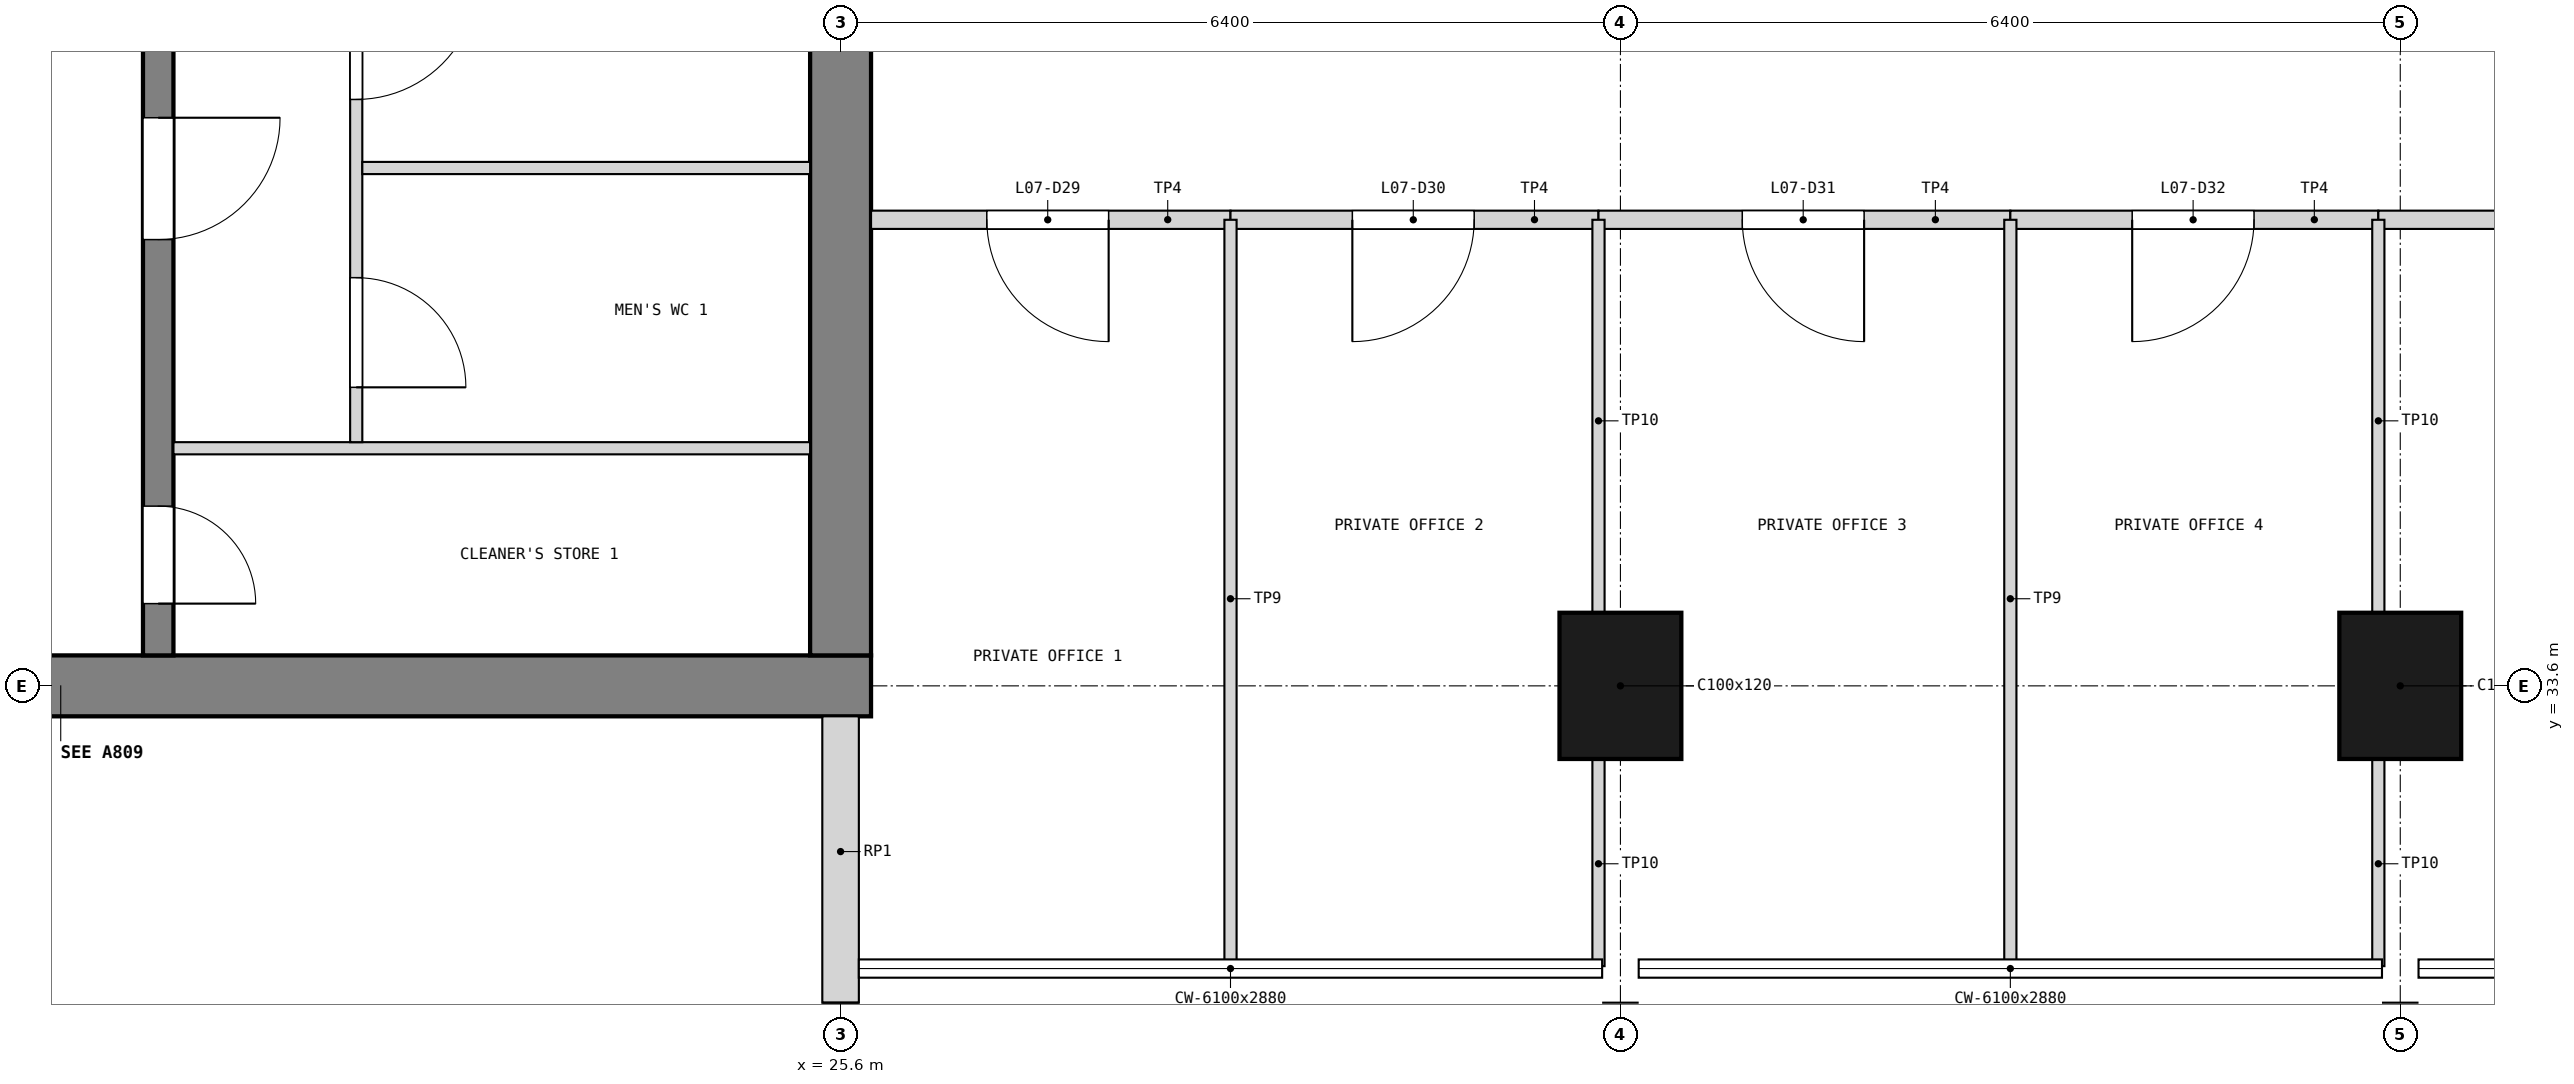
"""IFC4 building model, lengths in metres.
Left out: names, types, materials, properties, quantities, classifications, styles, units other than length and angle.
Written with IfcOpenShell. Run it as: python <this file> out.ifc"""

import sys

from ifc_helpers import new_model, si_unit, direction, frame, frame_2d, origin, origin_2d, place, context, subcontext, project, spatial, rectangle, extrude, element, fill, save


model = new_model("IFC4")
c1 = context("Model", 3, precision=1e-05, world=origin(), true_north=direction((0.0, 1.0)))
c2 = subcontext(c1, "Body", "Model", "MODEL_VIEW")
j1 = project(units=[si_unit("LENGTHUNIT", "METRE"), si_unit("PLANEANGLEUNIT", "RADIAN")], contexts=[c1])
p1 = place(None, origin())
s1 = spatial("IfcSite", under=j1, at=p1, CompositionType="ELEMENT")
p2 = place(p1, origin())
s2 = spatial("IfcBuilding", under=s1, at=p2, CompositionType="ELEMENT")
p3 = place(p2, frame((0.0, 0.0, 28.8)))
s3 = spatial("IfcBuildingStorey", under=s2, at=p3, CompositionType="ELEMENT", Elevation=28.8)
p4 = place(p3, frame((12.55, 33.6, 0.0), z_axis=(0.0, 0.0, 1.0), x_axis=(1.0, 0.0, 0.0)))
e1 = element("IfcWall", 1, at=p4, inside=s3, PredefinedType="SHEAR", context=c2, shape_type="SweptSolid", body=[
    extrude(rectangle(XDim=13.3, YDim=0.5, at=frame_2d((6.65, 0.0))), origin(), (0.0, 0.0, 1.0), 3.9),
])
p5 = place(p4, frame((1.85, 0.0, 1.0)))
e2 = element("IfcOpeningElement", 2, at=p5, cuts=e1, PredefinedType="OPENING", context=c2, shape_type="SweptSolid", body=[
    extrude(rectangle(XDim=0.4, YDim=2.0, at=frame_2d((0.2, 1.0))), frame((0.0, 0.26, 0.0), z_axis=(0.0, -1.0, 0.0), x_axis=(1.0, 0.0, 0.0)), (0.0, 0.0, 1.0), 0.52),
])
p6 = place(p3, frame((25.6, 33.85, 0.0), z_axis=(0.0, 0.0, 1.0), x_axis=(0.0, 1.0, 0.0)))
e3 = element("IfcWall", 3, at=p6, inside=s3, PredefinedType="SHEAR", context=c2, shape_type="SweptSolid", body=[
    extrude(rectangle(XDim=18.7, YDim=0.5, at=frame_2d((9.35, 0.0))), origin(), (0.0, 0.0, 1.0), 3.9),
])
p7 = place(p6, frame((8.35, 0.0, 0.0)))
e4 = element("IfcOpeningElement", 4, at=p7, cuts=e3, PredefinedType="OPENING", context=c2, shape_type="SweptSolid", body=[
    extrude(rectangle(XDim=2.0, YDim=2.1, at=frame_2d((1.0, 1.05))), frame((0.0, 0.26, 0.0), z_axis=(0.0, -1.0, 0.0), x_axis=(1.0, 0.0, 0.0)), (0.0, 0.0, 1.0), 0.52),
])
for number, where, z_axis, x_axis in (
    (5, (32.0, 33.6, 0.0), (0.0, 0.0, 1.0), (1.0, 0.0, 0.0)),
    (6, (38.4, 33.6, 0.0), (0.0, 0.0, 1.0), (1.0, 0.0, 0.0)),
):
    element("IfcColumn", number, at=place(p3, frame(where, z_axis=z_axis, x_axis=x_axis)), inside=s3, PredefinedType="COLUMN", context=c2, shape_type="SweptSolid", body=[
        extrude(rectangle(XDim=1.0, YDim=1.2, at=origin_2d()), origin(), (0.0, 0.0, 1.0), 3.9),
    ])
p8 = place(p3, frame((25.6, 31.0, 0.0), z_axis=(0.0, 0.0, 1.0), x_axis=(0.0, 1.0, 0.0)))
e7 = element("IfcWall", 7, at=p8, inside=s3, PredefinedType="SOLIDWALL", context=c2, shape_type="SweptSolid", body=[
    extrude(rectangle(XDim=2.35, YDim=0.3, at=frame_2d((1.175, 0.0))), origin(), (0.0, 0.0, 1.0), 2.88),
])
p9 = place(p3, frame((20.0, 33.85, 0.0), z_axis=(0.0, 0.0, 1.0), x_axis=(0.0, 1.0, 0.0)))
e8 = element("IfcWall", 8, at=p9, inside=s3, PredefinedType="SOLIDWALL", context=c2, shape_type="SweptSolid", body=[
    extrude(rectangle(XDim=6.075, YDim=0.25, at=frame_2d((3.038, 0.0))), origin(), (0.0, 0.0, 1.0), 3.6),
])
p10 = place(p9, frame((0.425, 0.0, 0.0)))
e9 = element("IfcOpeningElement", 9, at=p10, cuts=e8, PredefinedType="OPENING", context=c2, shape_type="SweptSolid", body=[
    extrude(rectangle(XDim=0.8, YDim=2.1, at=frame_2d((0.4, 1.05))), frame((0.0, 0.135, 0.0), z_axis=(0.0, -1.0, 0.0), x_axis=(1.0, 0.0, 0.0)), (0.0, 0.0, 1.0), 0.27),
])
p11 = place(p9, frame((3.413, 0.0, 0.0)))
e10 = element("IfcOpeningElement", 10, at=p11, cuts=e8, PredefinedType="OPENING", context=c2, shape_type="SweptSolid", body=[
    extrude(rectangle(XDim=1.0, YDim=2.1, at=frame_2d((0.5, 1.05))), frame((0.0, 0.135, 0.0), z_axis=(0.0, -1.0, 0.0), x_axis=(1.0, 0.0, 0.0)), (0.0, 0.0, 1.0), 0.27),
])
p12 = place(p3, frame((20.125, 35.55, 0.0), z_axis=(0.0, 0.0, 1.0), x_axis=(1.0, 0.0, 0.0)))
e11 = element("IfcWall", 11, at=p12, inside=s3, PredefinedType="PARTITIONING", context=c2, shape_type="SweptSolid", body=[
    extrude(rectangle(XDim=5.225, YDim=0.1, at=frame_2d((2.613, 0.0))), origin(), (0.0, 0.0, 1.0), 3.6),
])
p13 = place(p3, frame((21.625, 35.6, 0.0), z_axis=(0.0, 0.0, 1.0), x_axis=(0.0, 1.0, 0.0)))
e12 = element("IfcWall", 12, at=p13, inside=s3, PredefinedType="PARTITIONING", context=c2, shape_type="SweptSolid", body=[
    extrude(rectangle(XDim=4.325, YDim=0.1, at=frame_2d((2.163, 0.0))), origin(), (0.0, 0.0, 1.0), 3.6),
])
p14 = place(p13, frame((0.45, 0.0, 0.0)))
e13 = element("IfcOpeningElement", 13, at=p14, cuts=e12, PredefinedType="OPENING", context=c2, shape_type="SweptSolid", body=[
    extrude(rectangle(XDim=0.9, YDim=2.1, at=frame_2d((0.45, 1.05))), frame((0.0, 0.06, 0.0), z_axis=(0.0, -1.0, 0.0), x_axis=(1.0, 0.0, 0.0)), (0.0, 0.0, 1.0), 0.12),
])
p15 = place(p13, frame((2.812, 0.0, 0.0)))
e14 = element("IfcOpeningElement", 14, at=p15, cuts=e12, PredefinedType="OPENING", context=c2, shape_type="SweptSolid", body=[
    extrude(rectangle(XDim=1.0, YDim=2.1, at=frame_2d((0.5, 1.05))), frame((0.0, 0.06, 0.0), z_axis=(0.0, -1.0, 0.0), x_axis=(1.0, 0.0, 0.0)), (0.0, 0.0, 1.0), 0.12),
])
p16 = place(p3, frame((21.675, 37.85, 0.0), z_axis=(0.0, 0.0, 1.0), x_axis=(1.0, 0.0, 0.0)))
e15 = element("IfcWall", 15, at=p16, inside=s3, PredefinedType="PARTITIONING", context=c2, shape_type="SweptSolid", body=[
    extrude(rectangle(XDim=3.675, YDim=0.1, at=frame_2d((1.837, 0.0))), origin(), (0.0, 0.0, 1.0), 3.6),
])
p17 = place(p3, frame((25.85, 37.425, 0.0), z_axis=(0.0, 0.0, 1.0), x_axis=(1.0, 0.0, 0.0)))
e16 = element("IfcWall", 16, at=p17, inside=s3, PredefinedType="PARTITIONING", context=c2, shape_type="SweptSolid", body=[
    extrude(rectangle(XDim=2.95, YDim=0.15, at=frame_2d((1.475, 0.0))), origin(), (0.0, 0.0, 1.0), 3.68),
])
p18 = place(p17, frame((0.95, 0.0, 0.0)))
e17 = element("IfcOpeningElement", 17, at=p18, cuts=e16, PredefinedType="OPENING", context=c2, shape_type="SweptSolid", body=[
    extrude(rectangle(XDim=1.0, YDim=2.1, at=frame_2d((0.5, 1.05))), frame((0.0, 0.085, 0.0), z_axis=(0.0, -1.0, 0.0), x_axis=(1.0, 0.0, 0.0)), (0.0, 0.0, 1.0), 0.17),
])
p19 = place(p3, frame((28.8, 37.425, 0.0), z_axis=(0.0, 0.0, 1.0), x_axis=(1.0, 0.0, 0.0)))
e18 = element("IfcWall", 18, at=p19, inside=s3, PredefinedType="PARTITIONING", context=c2, shape_type="SweptSolid", body=[
    extrude(rectangle(XDim=3.02, YDim=0.15, at=frame_2d((1.51, 0.0))), origin(), (0.0, 0.0, 1.0), 3.68),
])
p20 = place(p19, frame((1.0, 0.0, 0.0)))
e19 = element("IfcOpeningElement", 19, at=p20, cuts=e18, PredefinedType="OPENING", context=c2, shape_type="SweptSolid", body=[
    extrude(rectangle(XDim=1.0, YDim=2.1, at=frame_2d((0.5, 1.05))), frame((0.0, 0.085, 0.0), z_axis=(0.0, -1.0, 0.0), x_axis=(1.0, 0.0, 0.0)), (0.0, 0.0, 1.0), 0.17),
])
p21 = place(p3, frame((31.82, 37.425, 0.0), z_axis=(0.0, 0.0, 1.0), x_axis=(1.0, 0.0, 0.0)))
e20 = element("IfcWall", 20, at=p21, inside=s3, PredefinedType="PARTITIONING", context=c2, shape_type="SweptSolid", body=[
    extrude(rectangle(XDim=3.38, YDim=0.15, at=frame_2d((1.69, 0.0))), origin(), (0.0, 0.0, 1.0), 3.68),
])
p22 = place(p21, frame((1.18, 0.0, 0.0)))
e21 = element("IfcOpeningElement", 21, at=p22, cuts=e20, PredefinedType="OPENING", context=c2, shape_type="SweptSolid", body=[
    extrude(rectangle(XDim=1.0, YDim=2.1, at=frame_2d((0.5, 1.05))), frame((0.0, 0.085, 0.0), z_axis=(0.0, -1.0, 0.0), x_axis=(1.0, 0.0, 0.0)), (0.0, 0.0, 1.0), 0.17),
])
p23 = place(p3, frame((35.2, 37.425, 0.0), z_axis=(0.0, 0.0, 1.0), x_axis=(1.0, 0.0, 0.0)))
e22 = element("IfcWall", 22, at=p23, inside=s3, PredefinedType="PARTITIONING", context=c2, shape_type="SweptSolid", body=[
    extrude(rectangle(XDim=3.02, YDim=0.15, at=frame_2d((1.51, 0.0))), origin(), (0.0, 0.0, 1.0), 3.68),
])
p24 = place(p23, frame((1.0, 0.0, 0.0)))
e23 = element("IfcOpeningElement", 23, at=p24, cuts=e22, PredefinedType="OPENING", context=c2, shape_type="SweptSolid", body=[
    extrude(rectangle(XDim=1.0, YDim=2.1, at=frame_2d((0.5, 1.05))), frame((0.0, 0.085, 0.0), z_axis=(0.0, -1.0, 0.0), x_axis=(1.0, 0.0, 0.0)), (0.0, 0.0, 1.0), 0.17),
])
p25 = place(p3, frame((38.22, 37.425, 0.0), z_axis=(0.0, 0.0, 1.0), x_axis=(1.0, 0.0, 0.0)))
e24 = element("IfcWall", 24, at=p25, inside=s3, PredefinedType="PARTITIONING", context=c2, shape_type="SweptSolid", body=[
    extrude(rectangle(XDim=13.16, YDim=0.15, at=frame_2d((6.58, 0.0))), origin(), (0.0, 0.0, 1.0), 3.68),
])
p26 = place(p25, frame((2.43, 0.0, 0.0)))
e25 = element("IfcOpeningElement", 25, at=p26, cuts=e24, PredefinedType="OPENING", context=c2, shape_type="SweptSolid", body=[
    extrude(rectangle(XDim=1.8, YDim=2.1, at=frame_2d((0.9, 1.05))), frame((0.0, 0.085, 0.0), z_axis=(0.0, -1.0, 0.0), x_axis=(1.0, 0.0, 0.0)), (0.0, 0.0, 1.0), 0.17),
])
p27 = place(p25, frame((8.93, 0.0, 0.0)))
e26 = element("IfcOpeningElement", 26, at=p27, cuts=e24, PredefinedType="OPENING", context=c2, shape_type="SweptSolid", body=[
    extrude(rectangle(XDim=1.8, YDim=2.1, at=frame_2d((0.9, 1.05))), frame((0.0, 0.085, 0.0), z_axis=(0.0, -1.0, 0.0), x_axis=(1.0, 0.0, 0.0)), (0.0, 0.0, 1.0), 0.17),
])
p28 = place(p3, frame((28.8, 31.3, 0.0), z_axis=(0.0, 0.0, 1.0), x_axis=(0.0, 1.0, 0.0)))
e27 = element("IfcWall", 27, at=p28, inside=s3, PredefinedType="PARTITIONING", context=c2, shape_type="SweptSolid", body=[
    extrude(rectangle(XDim=6.125, YDim=0.1, at=frame_2d((3.062, 0.0))), origin(), (0.0, 0.0, 1.0), 3.08),
])
p29 = place(p3, frame((31.82, 31.3, 0.0), z_axis=(0.0, 0.0, 1.0), x_axis=(0.0, 1.0, 0.0)))
e28 = element("IfcWall", 28, at=p29, inside=s3, PredefinedType="PARTITIONING", context=c2, shape_type="SweptSolid", body=[
    extrude(rectangle(XDim=1.72, YDim=0.1, at=frame_2d((0.86, 0.0))), origin(), (0.0, 0.0, 1.0), 2.78),
])
p30 = place(p3, frame((31.82, 34.18, 0.0), z_axis=(0.0, 0.0, 1.0), x_axis=(0.0, 1.0, 0.0)))
e29 = element("IfcWall", 29, at=p30, inside=s3, PredefinedType="PARTITIONING", context=c2, shape_type="SweptSolid", body=[
    extrude(rectangle(XDim=3.245, YDim=0.1, at=frame_2d((1.623, 0.0))), origin(), (0.0, 0.0, 1.0), 2.78),
])
p31 = place(p3, frame((35.2, 31.3, 0.0), z_axis=(0.0, 0.0, 1.0), x_axis=(0.0, 1.0, 0.0)))
e30 = element("IfcWall", 30, at=p31, inside=s3, PredefinedType="PARTITIONING", context=c2, shape_type="SweptSolid", body=[
    extrude(rectangle(XDim=6.125, YDim=0.1, at=frame_2d((3.062, 0.0))), origin(), (0.0, 0.0, 1.0), 3.08),
])
p32 = place(p3, frame((38.22, 31.3, 0.0), z_axis=(0.0, 0.0, 1.0), x_axis=(0.0, 1.0, 0.0)))
e31 = element("IfcWall", 31, at=p32, inside=s3, PredefinedType="PARTITIONING", context=c2, shape_type="SweptSolid", body=[
    extrude(rectangle(XDim=1.72, YDim=0.1, at=frame_2d((0.86, 0.0))), origin(), (0.0, 0.0, 1.0), 2.78),
])
p33 = place(p3, frame((38.22, 34.18, 0.0), z_axis=(0.0, 0.0, 1.0), x_axis=(0.0, 1.0, 0.0)))
e32 = element("IfcWall", 32, at=p33, inside=s3, PredefinedType="PARTITIONING", context=c2, shape_type="SweptSolid", body=[
    extrude(rectangle(XDim=3.245, YDim=0.1, at=frame_2d((1.623, 0.0))), origin(), (0.0, 0.0, 1.0), 2.78),
])
p34 = place(p10, frame((0.8, 0.0, 0.0), z_axis=(0.0, 0.0, 1.0), x_axis=(-1.0, 0.0, 0.0)))
e33 = element("IfcDoor", 33, at=p34, inside=s3, OperationType="SINGLE_SWING_RIGHT", PredefinedType="DOOR", context=c2, shape_type="SweptSolid", body=[
    extrude(rectangle(XDim=0.8, YDim=2.1, at=frame_2d((0.4, 1.05))), frame((0.0, 0.025, 0.0), z_axis=(0.0, -1.0, 0.0), x_axis=(1.0, 0.0, 0.0)), (0.0, 0.0, 1.0), 0.05),
])
fill(e9, e33)
p35 = place(p11, frame((1.0, 0.0, 0.0), z_axis=(0.0, 0.0, 1.0), x_axis=(-1.0, 0.0, 0.0)))
e34 = element("IfcDoor", 34, at=p35, inside=s3, OperationType="SINGLE_SWING_LEFT", PredefinedType="DOOR", context=c2, shape_type="SweptSolid", body=[
    extrude(rectangle(XDim=1.0, YDim=2.1, at=frame_2d((0.5, 1.05))), frame((0.0, 0.025, 0.0), z_axis=(0.0, -1.0, 0.0), x_axis=(1.0, 0.0, 0.0)), (0.0, 0.0, 1.0), 0.05),
])
fill(e10, e34)
p36 = place(p14, frame((0.9, 0.0, 0.0), z_axis=(0.0, 0.0, 1.0), x_axis=(-1.0, 0.0, 0.0)))
e35 = element("IfcDoor", 35, at=p36, inside=s3, OperationType="SINGLE_SWING_RIGHT", PredefinedType="DOOR", context=c2, shape_type="SweptSolid", body=[
    extrude(rectangle(XDim=0.9, YDim=2.1, at=frame_2d((0.45, 1.05))), frame((0.0, 0.025, 0.0), z_axis=(0.0, -1.0, 0.0), x_axis=(1.0, 0.0, 0.0)), (0.0, 0.0, 1.0), 0.05),
])
fill(e13, e35)
p37 = place(p15, frame((1.0, 0.0, 0.0), z_axis=(0.0, 0.0, 1.0), x_axis=(-1.0, 0.0, 0.0)))
e36 = element("IfcDoor", 36, at=p37, inside=s3, OperationType="SINGLE_SWING_LEFT", PredefinedType="DOOR", context=c2, shape_type="SweptSolid", body=[
    extrude(rectangle(XDim=1.0, YDim=2.1, at=frame_2d((0.5, 1.05))), frame((0.0, 0.025, 0.0), z_axis=(0.0, -1.0, 0.0), x_axis=(1.0, 0.0, 0.0)), (0.0, 0.0, 1.0), 0.05),
])
fill(e14, e36)
p38 = place(p18, frame((1.0, 0.0, 0.0), z_axis=(0.0, 0.0, 1.0), x_axis=(-1.0, 0.0, 0.0)))
e37 = element("IfcDoor", 37, at=p38, inside=s3, OperationType="SINGLE_SWING_LEFT", PredefinedType="DOOR", context=c2, shape_type="SweptSolid", body=[
    extrude(rectangle(XDim=1.0, YDim=2.1, at=frame_2d((0.5, 1.05))), frame((0.0, 0.025, 0.0), z_axis=(0.0, -1.0, 0.0), x_axis=(1.0, 0.0, 0.0)), (0.0, 0.0, 1.0), 0.05),
])
fill(e17, e37)
p39 = place(p20, frame((1.0, 0.0, 0.0), z_axis=(0.0, 0.0, 1.0), x_axis=(-1.0, 0.0, 0.0)))
e38 = element("IfcDoor", 38, at=p39, inside=s3, OperationType="SINGLE_SWING_RIGHT", PredefinedType="DOOR", context=c2, shape_type="SweptSolid", body=[
    extrude(rectangle(XDim=1.0, YDim=2.1, at=frame_2d((0.5, 1.05))), frame((0.0, 0.025, 0.0), z_axis=(0.0, -1.0, 0.0), x_axis=(1.0, 0.0, 0.0)), (0.0, 0.0, 1.0), 0.05),
])
fill(e19, e38)
p40 = place(p22, frame((1.0, 0.0, 0.0), z_axis=(0.0, 0.0, 1.0), x_axis=(-1.0, 0.0, 0.0)))
e39 = element("IfcDoor", 39, at=p40, inside=s3, OperationType="SINGLE_SWING_LEFT", PredefinedType="DOOR", context=c2, shape_type="SweptSolid", body=[
    extrude(rectangle(XDim=1.0, YDim=2.1, at=frame_2d((0.5, 1.05))), frame((0.0, 0.025, 0.0), z_axis=(0.0, -1.0, 0.0), x_axis=(1.0, 0.0, 0.0)), (0.0, 0.0, 1.0), 0.05),
])
fill(e21, e39)
p41 = place(p24, frame((1.0, 0.0, 0.0), z_axis=(0.0, 0.0, 1.0), x_axis=(-1.0, 0.0, 0.0)))
e40 = element("IfcDoor", 40, at=p41, inside=s3, OperationType="SINGLE_SWING_RIGHT", PredefinedType="DOOR", context=c2, shape_type="SweptSolid", body=[
    extrude(rectangle(XDim=1.0, YDim=2.1, at=frame_2d((0.5, 1.05))), frame((0.0, 0.025, 0.0), z_axis=(0.0, -1.0, 0.0), x_axis=(1.0, 0.0, 0.0)), (0.0, 0.0, 1.0), 0.05),
])
fill(e23, e40)
save(model, sys.argv[1])
